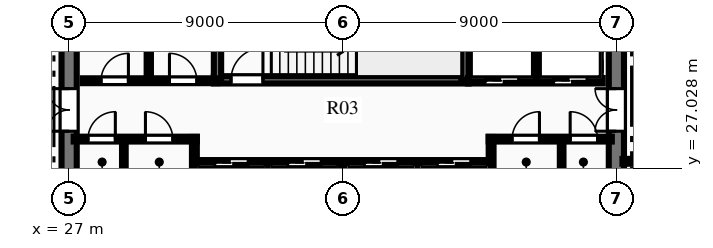
"""IFC4 building model, lengths in metres.
Left out: names, types, materials, properties, quantities, classifications, styles, units other than length and angle.
Written with IfcOpenShell. Run it as: python <this file> out.ifc"""

import sys

from ifc_helpers import new_model, si_unit, direction, frame, frame_2d, origin, place, context, subcontext, project, spatial, rectangle, extrude, element, fill, save


model = new_model("IFC4")
c1 = context("Model", 3, precision=1e-05, world=origin(), true_north=direction((0.0, 1.0)))
c2 = subcontext(c1, "Body", "Model", "MODEL_VIEW")
j1 = project(units=[si_unit("LENGTHUNIT", "METRE"), si_unit("PLANEANGLEUNIT", "RADIAN")], contexts=[c1])
p1 = place(None, origin())
s1 = spatial("IfcSite", under=j1, at=p1, CompositionType="ELEMENT")
p2 = place(p1, origin())
s2 = spatial("IfcBuilding", under=s1, at=p2, CompositionType="ELEMENT")
p3 = place(p2, frame((0.0, 0.0, 155.7)))
s3 = spatial("IfcBuildingStorey", under=s2, at=p3, CompositionType="ELEMENT", Elevation=155.7)
p4 = place(p3, frame((27.0, 18.25, 0.0), z_axis=(0.0, 0.0, 1.0), x_axis=(0.0, 1.0, 0.0)))
e1 = element("IfcWall", 1, at=p4, inside=s3, PredefinedType="SHEAR", context=c2, shape_type="SweptSolid", body=[
    extrude(rectangle(XDim=15.5, YDim=0.5, at=frame_2d((7.75, 0.0))), origin(), (0.0, 0.0, 1.0), 3.75),
])
p5 = place(p4, frame((9.99, 0.0, 0.0)))
e2 = element("IfcOpeningElement", 2, at=p5, cuts=e1, PredefinedType="OPENING", context=c2, shape_type="SweptSolid", body=[
    extrude(rectangle(XDim=1.4, YDim=2.2, at=frame_2d((0.7, 1.1))), frame((0.0, 0.26, 0.0), z_axis=(0.0, -1.0, 0.0), x_axis=(1.0, 0.0, 0.0)), (0.0, 0.0, 1.0), 0.52),
])
p6 = place(p3, frame((45.0, 18.25, 0.0), z_axis=(0.0, 0.0, 1.0), x_axis=(0.0, 1.0, 0.0)))
e3 = element("IfcWall", 3, at=p6, inside=s3, PredefinedType="SHEAR", context=c2, shape_type="SweptSolid", body=[
    extrude(rectangle(XDim=15.5, YDim=0.5, at=frame_2d((7.75, 0.0))), origin(), (0.0, 0.0, 1.0), 3.75),
])
p7 = place(p6, frame((9.99, 0.0, 0.0)))
e4 = element("IfcOpeningElement", 4, at=p7, cuts=e3, PredefinedType="OPENING", context=c2, shape_type="SweptSolid", body=[
    extrude(rectangle(XDim=1.4, YDim=2.2, at=frame_2d((0.7, 1.1))), frame((0.0, 0.26, 0.0), z_axis=(0.0, -1.0, 0.0), x_axis=(1.0, 0.0, 0.0)), (0.0, 0.0, 1.0), 0.52),
])
p8 = place(p3, frame((31.76, 29.93, 0.0), z_axis=(0.0, 0.0, 1.0), x_axis=(1.0, 0.0, 0.0)))
e5 = element("IfcWall", 5, at=p8, inside=s3, PredefinedType="SHEAR", context=c2, shape_type="SweptSolid", body=[
    extrude(rectangle(XDim=8.38, YDim=0.24, at=frame_2d((4.19, 0.0))), origin(), (0.0, 0.0, 1.0), 3.75),
])
p9 = place(p8, frame((0.565, 0.0, 0.0)))
e6 = element("IfcOpeningElement", 6, at=p9, cuts=e5, PredefinedType="OPENING", context=c2, shape_type="SweptSolid", body=[
    extrude(rectangle(XDim=1.05, YDim=2.15, at=frame_2d((0.525, 1.075))), frame((0.0, 0.13, 0.0), z_axis=(0.0, -1.0, 0.0), x_axis=(1.0, 0.0, 0.0)), (0.0, 0.0, 1.0), 0.26),
])
p10 = place(p3, frame((31.88, 29.93, 0.0), z_axis=(0.0, 0.0, 1.0), x_axis=(0.0, 1.0, 0.0)))
e7 = element("IfcWall", 7, at=p10, inside=s3, PredefinedType="SHEAR", context=c2, shape_type="SweptSolid", body=[
    extrude(rectangle(XDim=3.79, YDim=0.24, at=frame_2d((1.895, 0.0))), origin(), (0.0, 0.0, 1.0), 3.75),
])
p11 = place(p3, frame((40.02, 29.93, 0.0), z_axis=(0.0, 0.0, 1.0), x_axis=(0.0, 1.0, 0.0)))
e8 = element("IfcWall", 8, at=p11, inside=s3, PredefinedType="SHEAR", context=c2, shape_type="SweptSolid", body=[
    extrude(rectangle(XDim=3.85, YDim=0.24, at=frame_2d((1.925, 0.0))), origin(), (0.0, 0.0, 1.0), 3.75),
])
p12 = place(p3, frame((27.15, 27.98, 0.0), z_axis=(0.0, 0.0, 1.0), x_axis=(1.0, 0.0, 0.0)))
e9 = element("IfcWall", 9, at=p12, inside=s3, PredefinedType="PARTITIONING", context=c2, shape_type="SweptSolid", body=[
    extrude(rectangle(XDim=4.05, YDim=0.16, at=frame_2d((2.025, 0.0))), origin(), (0.0, 0.0, 1.0), 3.46),
])
p13 = place(p12, frame((0.47, 0.0, 0.0)))
e10 = element("IfcOpeningElement", 10, at=p13, cuts=e9, PredefinedType="OPENING", context=c2, shape_type="SweptSolid", body=[
    extrude(rectangle(XDim=0.9, YDim=2.15, at=frame_2d((0.45, 1.075))), frame((0.0, 0.09, 0.0), z_axis=(0.0, -1.0, 0.0), x_axis=(1.0, 0.0, 0.0)), (0.0, 0.0, 1.0), 0.18),
])
p14 = place(p12, frame((2.36, 0.0, 0.0)))
e11 = element("IfcOpeningElement", 11, at=p14, cuts=e9, PredefinedType="OPENING", context=c2, shape_type="SweptSolid", body=[
    extrude(rectangle(XDim=0.9, YDim=2.15, at=frame_2d((0.45, 1.075))), frame((0.0, 0.09, 0.0), z_axis=(0.0, -1.0, 0.0), x_axis=(1.0, 0.0, 0.0)), (0.0, 0.0, 1.0), 0.18),
])
p15 = place(p3, frame((31.12, 26.54, 0.0), z_axis=(0.0, 0.0, 1.0), x_axis=(0.0, 1.0, 0.0)))
e12 = element("IfcWall", 12, at=p15, inside=s3, PredefinedType="PARTITIONING", context=c2, shape_type="SweptSolid", body=[
    extrude(rectangle(XDim=1.51, YDim=0.16, at=frame_2d((0.755, 0.0))), origin(), (0.0, 0.0, 1.0), 3.46),
])
p16 = place(p3, frame((40.8, 27.98, 0.0), z_axis=(0.0, 0.0, 1.0), x_axis=(1.0, 0.0, 0.0)))
e13 = element("IfcWall", 13, at=p16, inside=s3, PredefinedType="PARTITIONING", context=c2, shape_type="SweptSolid", body=[
    extrude(rectangle(XDim=4.05, YDim=0.16, at=frame_2d((2.025, 0.0))), origin(), (0.0, 0.0, 1.0), 3.46),
])
p17 = place(p16, frame((0.77, 0.0, 0.0)))
e14 = element("IfcOpeningElement", 14, at=p17, cuts=e13, PredefinedType="OPENING", context=c2, shape_type="SweptSolid", body=[
    extrude(rectangle(XDim=0.9, YDim=2.15, at=frame_2d((0.45, 1.075))), frame((0.0, 0.09, 0.0), z_axis=(0.0, -1.0, 0.0), x_axis=(1.0, 0.0, 0.0)), (0.0, 0.0, 1.0), 0.18),
])
p18 = place(p16, frame((2.68, 0.0, 0.0)))
e15 = element("IfcOpeningElement", 15, at=p18, cuts=e13, PredefinedType="OPENING", context=c2, shape_type="SweptSolid", body=[
    extrude(rectangle(XDim=0.9, YDim=2.15, at=frame_2d((0.45, 1.075))), frame((0.0, 0.09, 0.0), z_axis=(0.0, -1.0, 0.0), x_axis=(1.0, 0.0, 0.0)), (0.0, 0.0, 1.0), 0.18),
])
p19 = place(p3, frame((40.88, 26.54, 0.0), z_axis=(0.0, 0.0, 1.0), x_axis=(0.0, 1.0, 0.0)))
e16 = element("IfcWall", 16, at=p19, inside=s3, PredefinedType="PARTITIONING", context=c2, shape_type="SweptSolid", body=[
    extrude(rectangle(XDim=1.51, YDim=0.16, at=frame_2d((0.755, 0.0))), origin(), (0.0, 0.0, 1.0), 3.46),
])
for number, where, z_axis, x_axis in (
    (17, (28.8, 26.54, 0.0), (0.0, 0.0, 1.0), (0.0, 1.0, 0.0)),
    (18, (43.2, 26.54, 0.0), (0.0, 0.0, 1.0), (0.0, 1.0, 0.0)),
):
    element("IfcWall", number, at=place(p3, frame(where, z_axis=z_axis, x_axis=x_axis)), inside=s3, PredefinedType="PARTITIONING", context=c2, shape_type="SweptSolid", body=[
        extrude(rectangle(XDim=1.44, YDim=0.12, at=frame_2d((0.72, 0.0))), origin(), (0.0, 0.0, 1.0), 3.46),
    ])
p20 = place(p3, frame((27.45, 29.9, 0.0), z_axis=(0.0, 0.0, 1.0), x_axis=(1.0, 0.0, 0.0)))
e19 = element("IfcWall", 19, at=p20, inside=s3, PredefinedType="PARTITIONING", context=c2, shape_type="SweptSolid", body=[
    extrude(rectangle(XDim=4.43, YDim=0.16, at=frame_2d((2.215, 0.0))), origin(), (0.0, 0.0, 1.0), 3.46),
])
p21 = place(p20, frame((0.6, 0.0, 0.0)))
e20 = element("IfcOpeningElement", 20, at=p21, cuts=e19, PredefinedType="OPENING", context=c2, shape_type="SweptSolid", body=[
    extrude(rectangle(XDim=0.9, YDim=2.15, at=frame_2d((0.45, 1.075))), frame((0.0, 0.09, 0.0), z_axis=(0.0, -1.0, 0.0), x_axis=(1.0, 0.0, 0.0)), (0.0, 0.0, 1.0), 0.18),
])
p22 = place(p20, frame((2.85, 0.0, 0.0)))
e21 = element("IfcOpeningElement", 21, at=p22, cuts=e19, PredefinedType="OPENING", context=c2, shape_type="SweptSolid", body=[
    extrude(rectangle(XDim=0.9, YDim=2.15, at=frame_2d((0.45, 1.075))), frame((0.0, 0.09, 0.0), z_axis=(0.0, -1.0, 0.0), x_axis=(1.0, 0.0, 0.0)), (0.0, 0.0, 1.0), 0.18),
])
p23 = place(p3, frame((29.62, 29.95, 0.0), z_axis=(0.0, 0.0, 1.0), x_axis=(0.0, 1.0, 0.0)))
e22 = element("IfcWall", 22, at=p23, inside=s3, PredefinedType="PARTITIONING", context=c2, shape_type="SweptSolid", body=[
    extrude(rectangle(XDim=3.6, YDim=0.14, at=frame_2d((1.8, 0.0))), origin(), (0.0, 0.0, 1.0), 3.46),
])
p24 = place(p3, frame((40.12, 29.9, 0.0), z_axis=(0.0, 0.0, 1.0), x_axis=(1.0, 0.0, 0.0)))
e23 = element("IfcWall", 23, at=p24, inside=s3, PredefinedType="PARTITIONING", context=c2, shape_type="SweptSolid", body=[
    extrude(rectangle(XDim=4.43, YDim=0.18, at=frame_2d((2.215, 0.0))), origin(), (0.0, 0.0, 1.0), 3.46),
])
p25 = place(p24, frame((0.565, 0.0, 0.0)))
e24 = element("IfcOpeningElement", 24, at=p25, cuts=e23, PredefinedType="OPENING", context=c2, shape_type="SweptSolid", body=[
    extrude(rectangle(XDim=1.1, YDim=2.15, at=frame_2d((0.55, 1.075))), frame((0.0, 0.1, 0.0), z_axis=(0.0, -1.0, 0.0), x_axis=(1.0, 0.0, 0.0)), (0.0, 0.0, 1.0), 0.2),
])
p26 = place(p24, frame((2.815, 0.0, 0.0)))
e25 = element("IfcOpeningElement", 25, at=p26, cuts=e23, PredefinedType="OPENING", context=c2, shape_type="SweptSolid", body=[
    extrude(rectangle(XDim=1.1, YDim=2.15, at=frame_2d((0.55, 1.075))), frame((0.0, 0.1, 0.0), z_axis=(0.0, -1.0, 0.0), x_axis=(1.0, 0.0, 0.0)), (0.0, 0.0, 1.0), 0.2),
])
p27 = place(p3, frame((42.37, 29.9, 0.0), z_axis=(0.0, 0.0, 1.0), x_axis=(0.0, 1.0, 0.0)))
e26 = element("IfcWall", 26, at=p27, inside=s3, PredefinedType="PARTITIONING", context=c2, shape_type="SweptSolid", body=[
    extrude(rectangle(XDim=3.75, YDim=0.18, at=frame_2d((1.875, 0.0))), origin(), (0.0, 0.0, 1.0), 3.46),
])
p28 = place(p3, frame((31.2, 27.2, 0.0), z_axis=(0.0, 0.0, 1.0), x_axis=(1.0, 0.0, 0.0)))
e27 = element("IfcWall", 27, at=p28, inside=s3, PredefinedType="PARTITIONING", context=c2, shape_type="SweptSolid", body=[
    extrude(rectangle(XDim=9.6, YDim=0.18, at=frame_2d((4.8, 0.0))), origin(), (0.0, 0.0, 1.0), 3.46),
])
p29 = place(p28, frame((0.59, 0.0, 0.0)))
e28 = element("IfcOpeningElement", 28, at=p29, cuts=e27, PredefinedType="OPENING", context=c2, shape_type="SweptSolid", body=[
    extrude(rectangle(XDim=1.1, YDim=2.15, at=frame_2d((0.55, 1.075))), frame((0.0, 0.1, 0.0), z_axis=(0.0, -1.0, 0.0), x_axis=(1.0, 0.0, 0.0)), (0.0, 0.0, 1.0), 0.2),
])
p30 = place(p28, frame((2.99, 0.0, 0.0)))
e29 = element("IfcOpeningElement", 29, at=p30, cuts=e27, PredefinedType="OPENING", context=c2, shape_type="SweptSolid", body=[
    extrude(rectangle(XDim=1.1, YDim=2.15, at=frame_2d((0.55, 1.075))), frame((0.0, 0.1, 0.0), z_axis=(0.0, -1.0, 0.0), x_axis=(1.0, 0.0, 0.0)), (0.0, 0.0, 1.0), 0.2),
])
p31 = place(p28, frame((5.51, 0.0, 0.0)))
e30 = element("IfcOpeningElement", 30, at=p31, cuts=e27, PredefinedType="OPENING", context=c2, shape_type="SweptSolid", body=[
    extrude(rectangle(XDim=1.1, YDim=2.15, at=frame_2d((0.55, 1.075))), frame((0.0, 0.1, 0.0), z_axis=(0.0, -1.0, 0.0), x_axis=(1.0, 0.0, 0.0)), (0.0, 0.0, 1.0), 0.2),
])
p32 = place(p28, frame((7.91, 0.0, 0.0)))
e31 = element("IfcOpeningElement", 31, at=p32, cuts=e27, PredefinedType="OPENING", context=c2, shape_type="SweptSolid", body=[
    extrude(rectangle(XDim=1.1, YDim=2.15, at=frame_2d((0.55, 1.075))), frame((0.0, 0.1, 0.0), z_axis=(0.0, -1.0, 0.0), x_axis=(1.0, 0.0, 0.0)), (0.0, 0.0, 1.0), 0.2),
])
for number, where, z_axis, x_axis in (
    (32, (33.54, 25.3, 0.0), (0.0, 0.0, 1.0), (0.0, 1.0, 0.0)),
    (33, (36.0, 25.3, 0.0), (0.0, 0.0, 1.0), (0.0, 1.0, 0.0)),
    (34, (38.46, 25.3, 0.0), (0.0, 0.0, 1.0), (0.0, 1.0, 0.0)),
):
    element("IfcWall", number, at=place(p3, frame(where, z_axis=z_axis, x_axis=x_axis)), inside=s3, PredefinedType="PARTITIONING", context=c2, shape_type="SweptSolid", body=[
        extrude(rectangle(XDim=1.9, YDim=0.18, at=frame_2d((0.95, 0.0))), origin(), (0.0, 0.0, 1.0), 3.46),
    ])
p33 = place(p3, frame((45.2, 27.25, 0.0), z_axis=(0.0, 0.0, 1.0), x_axis=(1.0, 0.0, 0.0)))
e35 = element("IfcWall", 35, at=p33, inside=s3, PredefinedType="PARTITIONING", context=c2, shape_type="SweptSolid", body=[
    extrude(rectangle(XDim=2.25, YDim=0.16, at=frame_2d((1.125, 0.0))), origin(), (0.0, 0.0, 1.0), 3.46),
])
p34 = place(p13, origin())
e36 = element("IfcDoor", 36, at=p34, inside=s3, OperationType="SINGLE_SWING_RIGHT", PredefinedType="DOOR", context=c2, shape_type="SweptSolid", body=[
    extrude(rectangle(XDim=0.9, YDim=2.15, at=frame_2d((0.45, 1.075))), frame((0.0, 0.025, 0.0), z_axis=(0.0, -1.0, 0.0), x_axis=(1.0, 0.0, 0.0)), (0.0, 0.0, 1.0), 0.05),
])
fill(e10, e36)
p35 = place(p14, origin())
e37 = element("IfcDoor", 37, at=p35, inside=s3, OperationType="SINGLE_SWING_LEFT", PredefinedType="DOOR", context=c2, shape_type="SweptSolid", body=[
    extrude(rectangle(XDim=0.9, YDim=2.15, at=frame_2d((0.45, 1.075))), frame((0.0, 0.025, 0.0), z_axis=(0.0, -1.0, 0.0), x_axis=(1.0, 0.0, 0.0)), (0.0, 0.0, 1.0), 0.05),
])
fill(e11, e37)
p36 = place(p17, origin())
e38 = element("IfcDoor", 38, at=p36, inside=s3, OperationType="SINGLE_SWING_RIGHT", PredefinedType="DOOR", context=c2, shape_type="SweptSolid", body=[
    extrude(rectangle(XDim=0.9, YDim=2.15, at=frame_2d((0.45, 1.075))), frame((0.0, 0.025, 0.0), z_axis=(0.0, -1.0, 0.0), x_axis=(1.0, 0.0, 0.0)), (0.0, 0.0, 1.0), 0.05),
])
fill(e14, e38)
p37 = place(p18, origin())
e39 = element("IfcDoor", 39, at=p37, inside=s3, OperationType="SINGLE_SWING_LEFT", PredefinedType="DOOR", context=c2, shape_type="SweptSolid", body=[
    extrude(rectangle(XDim=0.9, YDim=2.15, at=frame_2d((0.45, 1.075))), frame((0.0, 0.025, 0.0), z_axis=(0.0, -1.0, 0.0), x_axis=(1.0, 0.0, 0.0)), (0.0, 0.0, 1.0), 0.05),
])
fill(e15, e39)
p38 = place(p21, origin())
e40 = element("IfcDoor", 40, at=p38, inside=s3, OperationType="SINGLE_SWING_RIGHT", PredefinedType="DOOR", context=c2, shape_type="SweptSolid", body=[
    extrude(rectangle(XDim=0.9, YDim=2.15, at=frame_2d((0.45, 1.075))), frame((0.0, 0.025, 0.0), z_axis=(0.0, -1.0, 0.0), x_axis=(1.0, 0.0, 0.0)), (0.0, 0.0, 1.0), 0.05),
])
fill(e20, e40)
p39 = place(p22, origin())
e41 = element("IfcDoor", 41, at=p39, inside=s3, OperationType="SINGLE_SWING_LEFT", PredefinedType="DOOR", context=c2, shape_type="SweptSolid", body=[
    extrude(rectangle(XDim=0.9, YDim=2.15, at=frame_2d((0.45, 1.075))), frame((0.0, 0.025, 0.0), z_axis=(0.0, -1.0, 0.0), x_axis=(1.0, 0.0, 0.0)), (0.0, 0.0, 1.0), 0.05),
])
fill(e21, e41)
p40 = place(p9, origin())
e42 = element("IfcDoor", 42, at=p40, inside=s3, OperationType="SINGLE_SWING_RIGHT", PredefinedType="DOOR", context=c2, shape_type="SweptSolid", body=[
    extrude(rectangle(XDim=1.05, YDim=2.15, at=frame_2d((0.525, 1.075))), frame((0.0, 0.025, 0.0), z_axis=(0.0, -1.0, 0.0), x_axis=(1.0, 0.0, 0.0)), (0.0, 0.0, 1.0), 0.05),
])
fill(e6, e42)
p41 = place(p5, origin())
e43 = element("IfcDoor", 43, at=p41, inside=s3, OperationType="DOUBLE_DOOR_SINGLE_SWING", PredefinedType="DOOR", context=c2, shape_type="SweptSolid", body=[
    extrude(rectangle(XDim=1.4, YDim=2.2, at=frame_2d((0.7, 1.1))), frame((0.0, 0.025, 0.0), z_axis=(0.0, -1.0, 0.0), x_axis=(1.0, 0.0, 0.0)), (0.0, 0.0, 1.0), 0.05),
])
fill(e2, e43)
p42 = place(p7, origin())
e44 = element("IfcDoor", 44, at=p42, inside=s3, OperationType="DOUBLE_DOOR_SINGLE_SWING", PredefinedType="DOOR", context=c2, shape_type="SweptSolid", body=[
    extrude(rectangle(XDim=1.4, YDim=2.2, at=frame_2d((0.7, 1.1))), frame((0.0, 0.025, 0.0), z_axis=(0.0, -1.0, 0.0), x_axis=(1.0, 0.0, 0.0)), (0.0, 0.0, 1.0), 0.05),
])
fill(e4, e44)
p43 = place(p25, origin())
e45 = element("IfcDoor", 45, at=p43, inside=s3, OperationType="SLIDING_TO_LEFT", PredefinedType="DOOR", context=c2, shape_type="SweptSolid", body=[
    extrude(rectangle(XDim=1.1, YDim=2.15, at=frame_2d((0.55, 1.075))), frame((0.0, 0.025, 0.0), z_axis=(0.0, -1.0, 0.0), x_axis=(1.0, 0.0, 0.0)), (0.0, 0.0, 1.0), 0.05),
])
fill(e24, e45)
p44 = place(p26, origin())
e46 = element("IfcDoor", 46, at=p44, inside=s3, OperationType="SLIDING_TO_LEFT", PredefinedType="DOOR", context=c2, shape_type="SweptSolid", body=[
    extrude(rectangle(XDim=1.1, YDim=2.15, at=frame_2d((0.55, 1.075))), frame((0.0, 0.025, 0.0), z_axis=(0.0, -1.0, 0.0), x_axis=(1.0, 0.0, 0.0)), (0.0, 0.0, 1.0), 0.05),
])
fill(e25, e46)
p45 = place(p29, origin())
e47 = element("IfcDoor", 47, at=p45, inside=s3, OperationType="SLIDING_TO_LEFT", PredefinedType="DOOR", context=c2, shape_type="SweptSolid", body=[
    extrude(rectangle(XDim=1.1, YDim=2.15, at=frame_2d((0.55, 1.075))), frame((0.0, 0.025, 0.0), z_axis=(0.0, -1.0, 0.0), x_axis=(1.0, 0.0, 0.0)), (0.0, 0.0, 1.0), 0.05),
])
fill(e28, e47)
p46 = place(p30, origin())
e48 = element("IfcDoor", 48, at=p46, inside=s3, OperationType="SLIDING_TO_LEFT", PredefinedType="DOOR", context=c2, shape_type="SweptSolid", body=[
    extrude(rectangle(XDim=1.1, YDim=2.15, at=frame_2d((0.55, 1.075))), frame((0.0, 0.025, 0.0), z_axis=(0.0, -1.0, 0.0), x_axis=(1.0, 0.0, 0.0)), (0.0, 0.0, 1.0), 0.05),
])
fill(e29, e48)
p47 = place(p31, origin())
e49 = element("IfcDoor", 49, at=p47, inside=s3, OperationType="SLIDING_TO_LEFT", PredefinedType="DOOR", context=c2, shape_type="SweptSolid", body=[
    extrude(rectangle(XDim=1.1, YDim=2.15, at=frame_2d((0.55, 1.075))), frame((0.0, 0.025, 0.0), z_axis=(0.0, -1.0, 0.0), x_axis=(1.0, 0.0, 0.0)), (0.0, 0.0, 1.0), 0.05),
])
fill(e30, e49)
p48 = place(p32, origin())
e50 = element("IfcDoor", 50, at=p48, inside=s3, OperationType="SLIDING_TO_LEFT", PredefinedType="DOOR", context=c2, shape_type="SweptSolid", body=[
    extrude(rectangle(XDim=1.1, YDim=2.15, at=frame_2d((0.55, 1.075))), frame((0.0, 0.025, 0.0), z_axis=(0.0, -1.0, 0.0), x_axis=(1.0, 0.0, 0.0)), (0.0, 0.0, 1.0), 0.05),
])
fill(e31, e50)
save(model, sys.argv[1])
